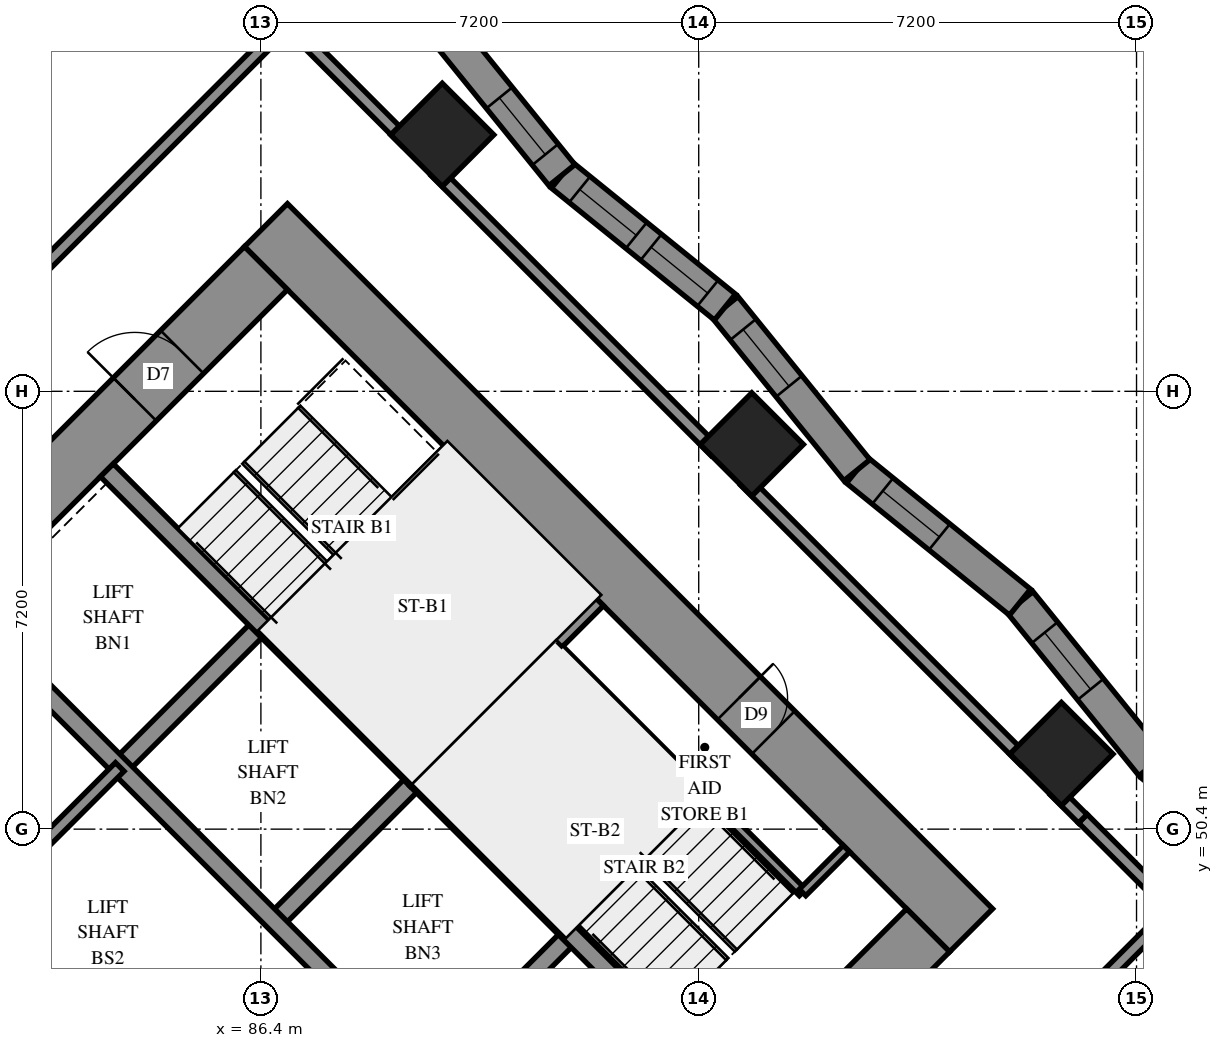
"""IFC4 building model, lengths in metres.
Left out: names, types, materials, properties, quantities, classifications, styles, units other than length and angle.
Written with IfcOpenShell. Run it as: python <this file> out.ifc"""

import sys

from ifc_helpers import new_model, si_unit, direction, frame, frame_2d, origin, origin_2d, place, context, subcontext, project, spatial, polyline, rectangle, outline, extrude, element, fill, save


model = new_model("IFC4")
c1 = context("Model", 3, precision=1e-05, world=origin(), true_north=direction((0.0, 1.0)))
c2 = subcontext(c1, "Body", "Model", "MODEL_VIEW")
j1 = project(units=[si_unit("LENGTHUNIT", "METRE"), si_unit("PLANEANGLEUNIT", "RADIAN")], contexts=[c1])
p1 = place(None, origin())
s1 = spatial("IfcSite", under=j1, at=p1, CompositionType="ELEMENT")
p2 = place(p1, origin())
s2 = spatial("IfcBuilding", under=s1, at=p2, CompositionType="ELEMENT")
p3 = place(p2, frame((0.0, 0.0, 33.8)))
s3 = spatial("IfcBuildingStorey", under=s2, at=p3, CompositionType="ELEMENT", Elevation=33.8)
for number, where, z_axis, x_axis in (
    (1, (89.382, 61.818, 0.0), (0.0, 0.0, 1.0), (0.707, -0.707, 0.0)),
    (2, (94.474, 56.727, 0.0), (0.0, 0.0, 1.0), (0.707, -0.707, 0.0)),
    (3, (99.565, 51.635, 0.0), (0.0, 0.0, 1.0), (0.707, -0.707, 0.0)),
):
    element("IfcColumn", number, at=place(p3, frame(where, z_axis=z_axis, x_axis=x_axis)), inside=s3, PredefinedType="COLUMN", context=c2, shape_type="SweptSolid", body=[
        extrude(rectangle(XDim=1.2, YDim=1.2, at=origin_2d()), origin(), (0.0, 0.0, 1.0), 3.1),
    ])
p4 = place(p3, frame((75.594, 49.443, -0.3), z_axis=(0.0, 0.0, 1.0), x_axis=(0.7071037324, -0.70710983, 0.0)))
e4 = element("IfcWall", 4, at=p4, inside=s3, PredefinedType="SHEAR", context=c2, shape_type="SweptSolid", body=[
    extrude(rectangle(XDim=16.4, YDim=1.0, at=frame_2d((8.2, 0.0))), origin(), (0.0, 0.0, 1.0), 2.7),
])
p5 = place(p3, frame((86.483, 60.333, -0.3), z_axis=(0.0, 0.0, 1.0), x_axis=(0.70710983, -0.7071037324, 0.0)))
e5 = element("IfcWall", 5, at=p5, inside=s3, PredefinedType="SHEAR", context=c2, shape_type="SweptSolid", body=[
    extrude(rectangle(XDim=16.4, YDim=1.0, at=frame_2d((8.2, 0.0))), origin(), (0.0, 0.0, 1.0), 2.7),
])
p6 = place(p5, frame((11.0, 0.0, 0.3)))
e6 = element("IfcOpeningElement", 6, at=p6, cuts=e5, PredefinedType="OPENING", context=c2, shape_type="SweptSolid", body=[
    extrude(rectangle(XDim=0.8, YDim=2.1, at=frame_2d((0.4, 1.05))), frame((0.0, 0.51, 0.0), z_axis=(0.0, -1.0, 0.0), x_axis=(1.0, 0.0, 0.0)), (0.0, 0.0, 1.0), 1.02),
])
p7 = place(p3, frame((76.301, 49.443, -0.3), z_axis=(0.0, 0.0, 1.0), x_axis=(0.7071067812, 0.7071067812, 0.0)))
e7 = element("IfcWall", 7, at=p7, inside=s3, PredefinedType="SHEAR", context=c2, shape_type="SweptSolid", body=[
    extrude(rectangle(XDim=14.4, YDim=1.0, at=frame_2d((7.2, 0.0))), origin(), (0.0, 0.0, 1.0), 2.7),
])
p8 = place(p7, frame((4.55, 0.0, 0.3)))
e8 = element("IfcOpeningElement", 8, at=p8, cuts=e7, PredefinedType="OPENING", context=c2, shape_type="SweptSolid", body=[
    extrude(rectangle(XDim=1.1, YDim=2.1, at=frame_2d((0.55, 1.05))), frame((0.0, 0.51, 0.0), z_axis=(0.0, -1.0, 0.0), x_axis=(1.0, 0.0, 0.0)), (0.0, 0.0, 1.0), 1.02),
])
p9 = place(p7, frame((11.35, 0.0, 0.3)))
e9 = element("IfcOpeningElement", 9, at=p9, cuts=e7, PredefinedType="OPENING", context=c2, shape_type="SweptSolid", body=[
    extrude(rectangle(XDim=1.1, YDim=2.1, at=frame_2d((0.55, 1.05))), frame((0.0, 0.51, 0.0), z_axis=(0.0, -1.0, 0.0), x_axis=(1.0, 0.0, 0.0)), (0.0, 0.0, 1.0), 1.02),
])
p10 = place(p3, frame((87.19, 38.554, -0.3), z_axis=(0.0, 0.0, 1.0), x_axis=(0.707103309, 0.7071102534, 0.0)))
e10 = element("IfcWall", 10, at=p10, inside=s3, PredefinedType="SHEAR", context=c2, shape_type="SweptSolid", body=[
    extrude(rectangle(XDim=14.4, YDim=1.0, at=frame_2d((7.2, 0.0))), origin(), (0.0, 0.0, 1.0), 2.7),
])
p11 = place(p10, frame((4.55, 0.0, 0.3)))
e11 = element("IfcOpeningElement", 11, at=p11, cuts=e10, PredefinedType="OPENING", context=c2, shape_type="SweptSolid", body=[
    extrude(rectangle(XDim=1.1, YDim=2.1, at=frame_2d((0.55, 1.05))), frame((0.0, 0.51, 0.0), z_axis=(0.0, -1.0, 0.0), x_axis=(1.0, 0.0, 0.0)), (0.0, 0.0, 1.0), 1.02),
])
p12 = place(p10, frame((11.35, 0.0, 0.3)))
e12 = element("IfcOpeningElement", 12, at=p12, cuts=e10, PredefinedType="OPENING", context=c2, shape_type="SweptSolid", body=[
    extrude(rectangle(XDim=1.1, YDim=2.1, at=frame_2d((0.55, 1.05))), frame((0.0, 0.51, 0.0), z_axis=(0.0, -1.0, 0.0), x_axis=(1.0, 0.0, 0.0)), (0.0, 0.0, 1.0), 1.02),
])
p13 = place(p3, frame((84.079, 51.423, 0.0), z_axis=(0.0, 0.0, 1.0), x_axis=(0.7071219326, 0.7070916295, 0.0)))
e13 = element("IfcWall", 13, at=p13, inside=s3, PredefinedType="SOLIDWALL", context=c2, shape_type="SweptSolid", body=[
    extrude(rectangle(XDim=3.3, YDim=0.3, at=frame_2d((1.65, 0.0))), origin(), (0.0, 0.0, 1.0), 3.1),
])
for number, where, z_axis, x_axis in (
    (14, (86.625, 48.878, 0.0), (0.0, 0.0, 1.0), (0.707, 0.707, 0.0)),
    (15, (89.17, 46.332, 0.0), (0.0, 0.0, 1.0), (0.707, 0.707, 0.0)),
):
    element("IfcWall", number, at=place(p3, frame(where, z_axis=z_axis, x_axis=x_axis)), inside=s3, PredefinedType="SOLIDWALL", context=c2, shape_type="SweptSolid", body=[
        extrude(rectangle(XDim=3.3, YDim=0.3, at=frame_2d((1.65, 0.0))), origin(), (0.0, 0.0, 1.0), 3.1),
    ])
p14 = place(p3, frame((78.988, 51.423, 0.0), z_axis=(0.0, 0.0, 1.0), x_axis=(0.7071067812, -0.7071067812, 0.0)))
e16 = element("IfcWall", 16, at=p14, inside=s3, PredefinedType="SOLIDWALL", context=c2, shape_type="SweptSolid", body=[
    extrude(rectangle(XDim=14.4, YDim=0.3, at=frame_2d((7.2, 0.0))), origin(), (0.0, 0.0, 1.0), 3.1),
])
p15 = place(p14, frame((1.25, 0.0, 0.0)))
e17 = element("IfcOpeningElement", 17, at=p15, cuts=e16, PredefinedType="OPENING", context=c2, shape_type="SweptSolid", body=[
    extrude(rectangle(XDim=1.1, YDim=2.1, at=frame_2d((0.55, 1.05))), frame((0.0, 0.16, 0.0), z_axis=(0.0, -1.0, 0.0), x_axis=(1.0, 0.0, 0.0)), (0.0, 0.0, 1.0), 0.32),
])
p16 = place(p14, frame((4.85, 0.0, 0.0)))
e18 = element("IfcOpeningElement", 18, at=p16, cuts=e16, PredefinedType="OPENING", context=c2, shape_type="SweptSolid", body=[
    extrude(rectangle(XDim=1.1, YDim=2.1, at=frame_2d((0.55, 1.05))), frame((0.0, 0.16, 0.0), z_axis=(0.0, -1.0, 0.0), x_axis=(1.0, 0.0, 0.0)), (0.0, 0.0, 1.0), 0.32),
])
p17 = place(p14, frame((8.45, 0.0, 0.0)))
e19 = element("IfcOpeningElement", 19, at=p17, cuts=e16, PredefinedType="OPENING", context=c2, shape_type="SweptSolid", body=[
    extrude(rectangle(XDim=1.1, YDim=2.1, at=frame_2d((0.55, 1.05))), frame((0.0, 0.16, 0.0), z_axis=(0.0, -1.0, 0.0), x_axis=(1.0, 0.0, 0.0)), (0.0, 0.0, 1.0), 0.32),
])
p18 = place(p14, frame((12.05, 0.0, 0.0)))
e20 = element("IfcOpeningElement", 20, at=p18, cuts=e16, PredefinedType="OPENING", context=c2, shape_type="SweptSolid", body=[
    extrude(rectangle(XDim=1.1, YDim=2.1, at=frame_2d((0.55, 1.05))), frame((0.0, 0.16, 0.0), z_axis=(0.0, -1.0, 0.0), x_axis=(1.0, 0.0, 0.0)), (0.0, 0.0, 1.0), 0.32),
])
p19 = place(p3, frame((81.534, 53.969, 0.0), z_axis=(0.0, 0.0, 1.0), x_axis=(0.707103309, -0.7071102534, 0.0)))
e21 = element("IfcWall", 21, at=p19, inside=s3, PredefinedType="SOLIDWALL", context=c2, shape_type="SweptSolid", body=[
    extrude(rectangle(XDim=14.4, YDim=0.3, at=frame_2d((7.2, 0.0))), origin(), (0.0, 0.0, 1.0), 3.1),
])
p20 = place(p19, frame((12.05, 0.0, 0.0)))
e22 = element("IfcOpeningElement", 22, at=p20, cuts=e21, PredefinedType="OPENING", context=c2, shape_type="SweptSolid", body=[
    extrude(rectangle(XDim=1.1, YDim=2.1, at=frame_2d((0.55, 1.05))), frame((0.0, 0.16, 0.0), z_axis=(0.0, -1.0, 0.0), x_axis=(1.0, 0.0, 0.0)), (0.0, 0.0, 1.0), 0.32),
])
for number, where, z_axis, x_axis in (
    (23, (83.867, 56.302, 0.0), (0.0, 0.0, 1.0), (0.707, -0.707, 0.0)),
    (24, (88.958, 51.211, 0.0), (0.0, 0.0, 1.0), (0.707, -0.707, 0.0)),
):
    element("IfcWall", number, at=place(p3, frame(where, z_axis=z_axis, x_axis=x_axis)), inside=s3, PredefinedType="SOLIDWALL", context=c2, shape_type="SweptSolid", body=[
        extrude(rectangle(XDim=7.2, YDim=0.3, at=frame_2d((3.6, 0.0))), origin(), (0.0, 0.0, 1.0), 3.1),
    ])
p21 = place(p3, frame((88.958, 51.211, 0.0), z_axis=(0.0, 0.0, 1.0), x_axis=(0.7071067812, 0.7071067812, 0.0)))
e25 = element("IfcWall", 25, at=p21, inside=s3, PredefinedType="SOLIDWALL", context=c2, shape_type="SweptSolid", body=[
    extrude(rectangle(XDim=4.2, YDim=0.3, at=frame_2d((2.1, 0.0))), origin(), (0.0, 0.0, 1.0), 3.1),
])
p22 = place(p3, frame((103.736, 49.281, 0.0), z_axis=(0.0, 0.0, 1.0), x_axis=(-0.7772131435, 0.6292374191, 0.0)))
e26 = element("IfcWall", 26, at=p22, inside=s3, PredefinedType="SOLIDWALL", context=c2, shape_type="SweptSolid", body=[
    extrude(outline(polyline([(-0.029, -0.275), (3.421, -0.275), (3.479, 0.275), (0.029, 0.275), (-0.029, -0.275)])), origin(), (0.0, 0.0, 1.0), 3.1),
])
p23 = place(p22, frame((1.535, 0.0, 0.5)))
e27 = element("IfcOpeningElement", 27, at=p23, cuts=e26, PredefinedType="OPENING", context=c2, shape_type="SweptSolid", body=[
    extrude(rectangle(XDim=1.2, YDim=2.45, at=frame_2d((0.6, 1.225))), frame((0.0, 0.285, 0.0), z_axis=(0.0, -1.0, 0.0), x_axis=(1.0, 0.0, 0.0)), (0.0, 0.0, 1.0), 0.57),
])
p24 = place(p3, frame((101.055, 51.452, 0.0), z_axis=(0.0, 0.0, 1.0), x_axis=(-0.6292374191, 0.7772131435, 0.0)))
e28 = element("IfcWall", 28, at=p24, inside=s3, PredefinedType="SOLIDWALL", context=c2, shape_type="SweptSolid", body=[
    extrude(outline(polyline([(0.029, -0.275), (3.479, -0.275), (3.421, 0.275), (-0.029, 0.275), (0.029, -0.275)])), origin(), (0.0, 0.0, 1.0), 3.1),
])
p25 = place(p24, frame((1.605, 0.0, 0.5)))
e29 = element("IfcOpeningElement", 29, at=p25, cuts=e28, PredefinedType="OPENING", context=c2, shape_type="SweptSolid", body=[
    extrude(rectangle(XDim=1.2, YDim=2.45, at=frame_2d((0.6, 1.225))), frame((0.0, 0.285, 0.0), z_axis=(0.0, -1.0, 0.0), x_axis=(1.0, 0.0, 0.0)), (0.0, 0.0, 1.0), 0.57),
])
p26 = place(p3, frame((98.884, 54.133, 0.0), z_axis=(0.0, 0.0, 1.0), x_axis=(-0.7772131435, 0.6292374191, 0.0)))
e30 = element("IfcWall", 30, at=p26, inside=s3, PredefinedType="SOLIDWALL", context=c2, shape_type="SweptSolid", body=[
    extrude(outline(polyline([(-0.029, -0.275), (3.421, -0.275), (3.479, 0.275), (0.029, 0.275), (-0.029, -0.275)])), origin(), (0.0, 0.0, 1.0), 3.1),
])
p27 = place(p26, frame((1.705, 0.0, 0.5)))
e31 = element("IfcOpeningElement", 31, at=p27, cuts=e30, PredefinedType="OPENING", context=c2, shape_type="SweptSolid", body=[
    extrude(rectangle(XDim=1.2, YDim=2.45, at=frame_2d((0.6, 1.225))), frame((0.0, 0.285, 0.0), z_axis=(0.0, -1.0, 0.0), x_axis=(1.0, 0.0, 0.0)), (0.0, 0.0, 1.0), 0.57),
])
p28 = place(p3, frame((96.202, 56.304, 0.0), z_axis=(0.0, 0.0, 1.0), x_axis=(-0.6292374191, 0.7772131435, 0.0)))
e32 = element("IfcWall", 32, at=p28, inside=s3, PredefinedType="SOLIDWALL", context=c2, shape_type="SweptSolid", body=[
    extrude(outline(polyline([(0.029, -0.275), (3.479, -0.275), (3.421, 0.275), (-0.029, 0.275), (0.029, -0.275)])), origin(), (0.0, 0.0, 1.0), 3.1),
])
p29 = place(p28, frame((1.775, 0.0, 0.5)))
e33 = element("IfcOpeningElement", 33, at=p29, cuts=e32, PredefinedType="OPENING", context=c2, shape_type="SweptSolid", body=[
    extrude(rectangle(XDim=1.2, YDim=2.45, at=frame_2d((0.6, 1.225))), frame((0.0, 0.285, 0.0), z_axis=(0.0, -1.0, 0.0), x_axis=(1.0, 0.0, 0.0)), (0.0, 0.0, 1.0), 0.57),
])
p30 = place(p3, frame((94.032, 58.985, 0.0), z_axis=(0.0, 0.0, 1.0), x_axis=(-0.7772273194, 0.6292199091, 0.0)))
e34 = element("IfcWall", 34, at=p30, inside=s3, PredefinedType="SOLIDWALL", context=c2, shape_type="SweptSolid", body=[
    extrude(outline(polyline([(-0.029, -0.275), (3.421, -0.275), (3.479, 0.275), (0.029, 0.275), (-0.029, -0.275)])), origin(), (0.0, 0.0, 1.0), 3.1),
])
p31 = place(p30, frame((0.364, 0.0, 0.5)))
e35 = element("IfcOpeningElement", 35, at=p31, cuts=e34, PredefinedType="OPENING", context=c2, shape_type="SweptSolid", body=[
    extrude(rectangle(XDim=1.2, YDim=2.45, at=frame_2d((0.6, 1.225))), frame((0.0, 0.285, 0.0), z_axis=(0.0, -1.0, 0.0), x_axis=(1.0, 0.0, 0.0)), (0.0, 0.0, 1.0), 0.57),
])
p32 = place(p30, frame((1.875, 0.0, 0.5)))
e36 = element("IfcOpeningElement", 36, at=p32, cuts=e34, PredefinedType="OPENING", context=c2, shape_type="SweptSolid", body=[
    extrude(rectangle(XDim=1.2, YDim=2.45, at=frame_2d((0.6, 1.225))), frame((0.0, 0.285, 0.0), z_axis=(0.0, -1.0, 0.0), x_axis=(1.0, 0.0, 0.0)), (0.0, 0.0, 1.0), 0.57),
])
p33 = place(p3, frame((91.35, 61.156, 0.0), z_axis=(0.0, 0.0, 1.0), x_axis=(-0.6292374191, 0.7772131435, 0.0)))
e37 = element("IfcWall", 37, at=p33, inside=s3, PredefinedType="SOLIDWALL", context=c2, shape_type="SweptSolid", body=[
    extrude(outline(polyline([(0.029, -0.275), (3.479, -0.275), (3.421, 0.275), (-0.029, 0.275), (0.029, -0.275)])), origin(), (0.0, 0.0, 1.0), 3.1),
])
p34 = place(p33, frame((0.435, 0.0, 0.5)))
e38 = element("IfcOpeningElement", 38, at=p34, cuts=e37, PredefinedType="OPENING", context=c2, shape_type="SweptSolid", body=[
    extrude(rectangle(XDim=1.2, YDim=2.45, at=frame_2d((0.6, 1.225))), frame((0.0, 0.285, 0.0), z_axis=(0.0, -1.0, 0.0), x_axis=(1.0, 0.0, 0.0)), (0.0, 0.0, 1.0), 0.57),
])
p35 = place(p3, frame((91.313, 53.354, 0.0), z_axis=(0.0, 0.0, 1.0), x_axis=(0.7071067812, -0.7071067812, 0.0)))
e39 = element("IfcWall", 39, at=p35, inside=s3, PredefinedType="PARTITIONING", context=c2, shape_type="SweptSolid", body=[
    extrude(rectangle(XDim=5.65, YDim=0.15, at=frame_2d((2.825, 0.0))), origin(), (0.0, 0.0, 1.0), 3.1),
])
p36 = place(p3, frame((95.308, 49.358, 0.0), z_axis=(0.0, 0.0, 1.0), x_axis=(0.70705776, 0.707155799, 0.0)))
e40 = element("IfcWall", 40, at=p36, inside=s3, PredefinedType="PARTITIONING", context=c2, shape_type="SweptSolid", body=[
    extrude(rectangle(XDim=1.02, YDim=0.15, at=frame_2d((0.51, 0.0))), origin(), (0.0, 0.0, 1.0), 3.1),
])
p37 = place(p3, frame((81.534, 48.878, 0.0), z_axis=(0.0, 0.0, 1.0), x_axis=(0.707092892, 0.7071206701, 0.0)))
e41 = element("IfcWall", 41, at=p37, inside=s3, PredefinedType="PARTITIONING", context=c2, shape_type="SweptSolid", body=[
    extrude(rectangle(XDim=3.6, YDim=0.2, at=frame_2d((1.8, 0.0))), origin(), (0.0, 0.0, 1.0), 3.1),
])
p38 = place(p3, frame((94.901, 42.583, 0.0), z_axis=(0.0, 0.0, 1.0), x_axis=(0.7072154749, 0.7069980708, 0.0)))
e42 = element("IfcWall", 42, at=p38, inside=s3, PredefinedType="PARTITIONING", context=c2, shape_type="SweptSolid", body=[
    extrude(rectangle(XDim=9.2, YDim=0.2, at=frame_2d((4.6, 0.0))), origin(), (0.0, 0.0, 1.0), 3.1),
])
p39 = place(p3, frame((81.052, 57.873, 0.0), z_axis=(0.0, 0.0, 1.0), x_axis=(0.7071067812, 0.7071067812, 0.0)))
e43 = element("IfcWall", 43, at=p39, inside=s3, PredefinedType="PARTITIONING", context=c2, shape_type="SweptSolid", body=[
    extrude(rectangle(XDim=8.18, YDim=0.2, at=frame_2d((4.09, 0.0))), origin(), (0.0, 0.0, 1.0), 3.1),
])
p40 = place(p39, frame((0.823, 0.0, 0.0)))
e44 = element("IfcOpeningElement", 44, at=p40, cuts=e43, PredefinedType="OPENING", context=c2, shape_type="SweptSolid", body=[
    extrude(rectangle(XDim=1.0, YDim=2.1, at=frame_2d((0.5, 1.05))), frame((0.0, 0.11, 0.0), z_axis=(0.0, -1.0, 0.0), x_axis=(1.0, 0.0, 0.0)), (0.0, 0.0, 1.0), 0.22),
])
p41 = place(p3, frame((96.947, 43.929, 0.0), z_axis=(0.0, 0.0, 1.0), x_axis=(0.7071067812, 0.7071067812, 0.0)))
e45 = element("IfcWall", 45, at=p41, inside=s3, PredefinedType="PARTITIONING", context=c2, shape_type="SweptSolid", body=[
    extrude(rectangle(XDim=8.201, YDim=0.2, at=frame_2d((4.101, 0.0))), origin(), (0.0, 0.0, 1.0), 3.1),
])
p42 = place(p3, frame((89.271, 61.215, 0.0), z_axis=(0.0, 0.0, 1.0), x_axis=(0.7071067812, -0.7071067812, 0.0)))
e46 = element("IfcWall", 46, at=p42, inside=s3, PredefinedType="PARTITIONING", context=c2, shape_type="SweptSolid", body=[
    extrude(rectangle(XDim=6.505, YDim=0.2, at=frame_2d((3.253, 0.0))), origin(), (0.0, 0.0, 1.0), 3.1),
])
p43 = place(p3, frame((94.363, 56.123, 0.0), z_axis=(0.0, 0.0, 1.0), x_axis=(0.7071067812, -0.7071067812, 0.0)))
e47 = element("IfcWall", 47, at=p43, inside=s3, PredefinedType="PARTITIONING", context=c2, shape_type="SweptSolid", body=[
    extrude(rectangle(XDim=6.503, YDim=0.2, at=frame_2d((3.251, 0.0))), origin(), (0.0, 0.0, 1.0), 3.1),
])
p44 = place(p3, frame((86.841, 63.659, 0.0), z_axis=(0.0, 0.0, 1.0), x_axis=(0.7067795096, -0.7074339014, 0.0)))
e48 = element("IfcWall", 48, at=p44, inside=s3, PredefinedType="PARTITIONING", context=c2, shape_type="SweptSolid", body=[
    extrude(rectangle(XDim=2.751, YDim=0.2, at=frame_2d((1.375, 0.0))), origin(), (0.0, 0.0, 1.0), 3.1),
])
p45 = place(p3, frame((99.918, 50.574, 0.0), z_axis=(0.0, 0.0, 1.0), x_axis=(0.7075827869, -0.7066304548, 0.0)))
e49 = element("IfcWall", 49, at=p45, inside=s3, PredefinedType="PARTITIONING", context=c2, shape_type="SweptSolid", body=[
    extrude(rectangle(XDim=2.1, YDim=0.2, at=frame_2d((1.05, 0.0))), origin(), (0.0, 0.0, 1.0), 3.1),
])
p46 = place(p3, frame((99.453, 51.033, 0.0), z_axis=(0.0, 0.0, 1.0), x_axis=(0.7071067812, -0.7071067812, 0.0)))
e50 = element("IfcWall", 50, at=p46, inside=s3, PredefinedType="PARTITIONING", context=c2, shape_type="SweptSolid", body=[
    extrude(rectangle(XDim=0.653, YDim=0.2, at=frame_2d((0.327, 0.0))), origin(), (0.0, 0.0, 1.0), 3.1),
])
p47 = place(p25, origin())
e51 = element("IfcWindow", 51, at=p47, inside=s3, PartitioningType="SINGLE_PANEL", PredefinedType="WINDOW", context=c2, shape_type="SweptSolid", body=[
    extrude(rectangle(XDim=1.2, YDim=2.45, at=frame_2d((0.6, 1.225))), frame((0.0, 0.155, 0.0), z_axis=(0.0, -1.0, 0.0), x_axis=(1.0, 0.0, 0.0)), (0.0, 0.0, 1.0), 0.06),
])
fill(e29, e51)
p48 = place(p27, origin())
e52 = element("IfcWindow", 52, at=p48, inside=s3, PartitioningType="SINGLE_PANEL", PredefinedType="WINDOW", context=c2, shape_type="SweptSolid", body=[
    extrude(rectangle(XDim=1.2, YDim=2.45, at=frame_2d((0.6, 1.225))), frame((0.0, 0.155, 0.0), z_axis=(0.0, -1.0, 0.0), x_axis=(1.0, 0.0, 0.0)), (0.0, 0.0, 1.0), 0.06),
])
fill(e31, e52)
p49 = place(p29, origin())
e53 = element("IfcWindow", 53, at=p49, inside=s3, PartitioningType="SINGLE_PANEL", PredefinedType="WINDOW", context=c2, shape_type="SweptSolid", body=[
    extrude(rectangle(XDim=1.2, YDim=2.45, at=frame_2d((0.6, 1.225))), frame((0.0, 0.155, 0.0), z_axis=(0.0, -1.0, 0.0), x_axis=(1.0, 0.0, 0.0)), (0.0, 0.0, 1.0), 0.06),
])
fill(e33, e53)
p50 = place(p31, origin())
e54 = element("IfcWindow", 54, at=p50, inside=s3, PartitioningType="SINGLE_PANEL", PredefinedType="WINDOW", context=c2, shape_type="SweptSolid", body=[
    extrude(rectangle(XDim=1.2, YDim=2.45, at=frame_2d((0.6, 1.225))), frame((0.0, 0.155, 0.0), z_axis=(0.0, -1.0, 0.0), x_axis=(1.0, 0.0, 0.0)), (0.0, 0.0, 1.0), 0.06),
])
fill(e35, e54)
p51 = place(p32, origin())
e55 = element("IfcWindow", 55, at=p51, inside=s3, PartitioningType="SINGLE_PANEL", PredefinedType="WINDOW", context=c2, shape_type="SweptSolid", body=[
    extrude(rectangle(XDim=1.2, YDim=2.45, at=frame_2d((0.6, 1.225))), frame((0.0, 0.155, 0.0), z_axis=(0.0, -1.0, 0.0), x_axis=(1.0, 0.0, 0.0)), (0.0, 0.0, 1.0), 0.06),
])
fill(e36, e55)
p52 = place(p34, origin())
e56 = element("IfcWindow", 56, at=p52, inside=s3, PartitioningType="SINGLE_PANEL", PredefinedType="WINDOW", context=c2, shape_type="SweptSolid", body=[
    extrude(rectangle(XDim=1.2, YDim=2.45, at=frame_2d((0.6, 1.225))), frame((0.0, 0.155, 0.0), z_axis=(0.0, -1.0, 0.0), x_axis=(1.0, 0.0, 0.0)), (0.0, 0.0, 1.0), 0.06),
])
fill(e38, e56)
p53 = place(p6, origin())
e57 = element("IfcDoor", 57, at=p53, inside=s3, OperationType="SINGLE_SWING_RIGHT", PredefinedType="DOOR", context=c2, shape_type="SweptSolid", body=[
    extrude(rectangle(XDim=0.8, YDim=2.1, at=frame_2d((0.4, 1.05))), frame((0.0, -0.44, 0.0), z_axis=(0.0, -1.0, 0.0), x_axis=(1.0, 0.0, 0.0)), (0.0, 0.0, 1.0), 0.05),
])
fill(e6, e57)
p54 = place(p9, origin())
e58 = element("IfcDoor", 58, at=p54, inside=s3, OperationType="SINGLE_SWING_LEFT", PredefinedType="DOOR", context=c2, shape_type="SweptSolid", body=[
    extrude(rectangle(XDim=1.1, YDim=2.1, at=frame_2d((0.55, 1.05))), frame((0.0, 0.025, 0.0), z_axis=(0.0, -1.0, 0.0), x_axis=(1.0, 0.0, 0.0)), (0.0, 0.0, 1.0), 0.05),
])
fill(e9, e58)
save(model, sys.argv[1])
